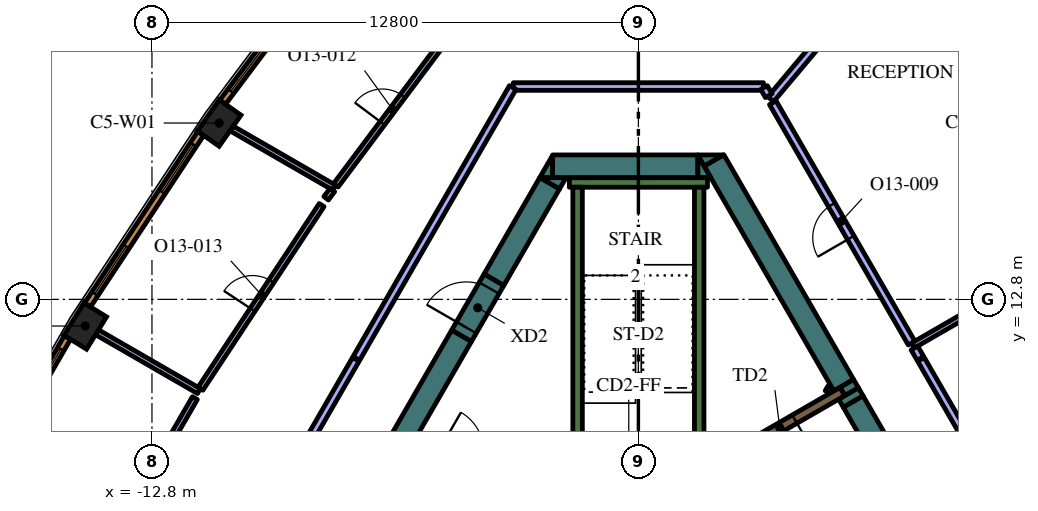
"""IFC4 building model, lengths in metres.
Left out: names, types, materials, properties, quantities, classifications, styles, units other than length and angle.
Written with IfcOpenShell. Run it as: python <this file> out.ifc"""

import sys

from ifc_helpers import new_model, si_unit, direction, frame, frame_2d, origin, origin_2d, place, context, subcontext, project, spatial, polyline, rectangle, outline, extrude, element, fill, save


model = new_model("IFC4")
c1 = context("Model", 3, precision=1e-05, world=origin(), true_north=direction((0.0, 1.0)))
c2 = subcontext(c1, "Body", "Model", "MODEL_VIEW")
j1 = project(units=[si_unit("LENGTHUNIT", "METRE"), si_unit("PLANEANGLEUNIT", "RADIAN")], contexts=[c1])
p1 = place(None, origin())
s1 = spatial("IfcSite", under=j1, at=p1, CompositionType="ELEMENT")
p2 = place(p1, origin())
s2 = spatial("IfcBuilding", under=s1, at=p2, CompositionType="ELEMENT")
p3 = place(p2, frame((0.0, 0.0, 296.4)))
s3 = spatial("IfcBuildingStorey", under=s2, at=p3, CompositionType="ELEMENT", Elevation=296.4)
for number, where, z_axis, x_axis in (
    (1, (-11.032, 17.44, 0.0), (0.0, 0.0, 1.0), (-0.575, -0.818, 0.0)),
    (2, (-14.556, 12.098, 0.0), (0.0, 0.0, 1.0), (-0.526, -0.851, 0.0)),
):
    element("IfcColumn", number, at=place(p3, frame(where, z_axis=z_axis, x_axis=x_axis)), inside=s3, PredefinedType="COLUMN", context=c2, shape_type="SweptSolid", body=[
        extrude(rectangle(XDim=1.0, YDim=0.7, at=origin_2d()), origin(), (0.0, 0.0, 1.0), 4.2),
    ])
p4 = place(p3, frame((5.529, 10.324, 0.0), z_axis=(0.0, 0.0, 1.0), x_axis=(0.499122205112, -0.866531606097, 0.0)))
e3 = element("IfcWall", 3, at=p4, inside=s3, PredefinedType="SOLIDWALL", context=c2, shape_type="SweptSolid", body=[
    extrude(rectangle(XDim=0.247, YDim=0.6, at=frame_2d((0.123, 0.0))), origin(), (0.0, 0.0, 1.0), 4.2),
])
p5 = place(p3, frame((1.989, 16.456, 0.0), z_axis=(0.0, 0.0, 1.0), x_axis=(0.499973159588, -0.866040899549, 0.0)))
e4 = element("IfcWall", 4, at=p5, inside=s3, PredefinedType="SOLIDWALL", context=c2, shape_type="SweptSolid", body=[
    extrude(rectangle(XDim=6.828, YDim=0.6, at=frame_2d((3.414, 0.0))), origin(), (0.0, 0.0, 1.0), 4.2),
])
p6 = place(p3, origin())
e5 = element("IfcWall", 5, at=p6, inside=s3, PredefinedType="SOLIDWALL", context=c2, shape_type="SweptSolid", body=[
    extrude(outline(polyline([(5.664, 10.691), (5.788, 10.476), (5.432, 10.271), (5.308, 10.486), (5.664, 10.691)])), origin(), (0.0, 0.0, 1.0), 4.2),
])
e6 = element("IfcWall", 6, at=p6, inside=s3, PredefinedType="SOLIDWALL", context=c2, shape_type="SweptSolid", body=[
    extrude(outline(polyline([(1.559, 16.6), (2.235, 16.6), (1.728, 16.307), (1.559, 16.6)])), origin(), (0.0, 0.0, 1.0), 4.2),
])
p7 = place(p3, frame((8.192, 5.711, 0.0), z_axis=(0.0, 0.0, 1.0), x_axis=(-0.500006836656, 0.866021456604, 0.0)))
e7 = element("IfcWall", 7, at=p7, inside=s3, PredefinedType="SOLIDWALL", context=c2, shape_type="SweptSolid", body=[
    extrude(rectangle(XDim=5.078, YDim=0.6, at=frame_2d((2.539, 0.0))), origin(), (0.0, 0.0, 1.0), 4.2),
])
p8 = place(p3, frame((-2.258, 16.3, 0.0), z_axis=(0.0, 0.0, 1.0), x_axis=(1.0, 0.0, 0.0)))
e8 = element("IfcWall", 8, at=p8, inside=s3, PredefinedType="SOLIDWALL", context=c2, shape_type="SweptSolid", body=[
    extrude(rectangle(XDim=3.823, YDim=0.6, at=frame_2d((1.912, 0.0))), origin(), (0.0, 0.0, 1.0), 4.2),
])
e9 = element("IfcWall", 9, at=p6, inside=s3, PredefinedType="SOLIDWALL", context=c2, shape_type="SweptSolid", body=[
    extrude(outline(polyline([(1.905, 16.0), (1.567, 16.0), (1.567, 16.585), (1.905, 16.0)])), origin(), (0.0, 0.0, 1.0), 4.2),
])
e10 = element("IfcWall", 10, at=p6, inside=s3, PredefinedType="SOLIDWALL", context=c2, shape_type="SweptSolid", body=[
    extrude(outline(polyline([(-2.598, 16.0), (-2.26, 16.585), (-2.26, 16.0), (-2.598, 16.0)])), origin(), (0.0, 0.0, 1.0), 4.2),
])
p9 = place(p3, frame((-2.335, 15.855, 0.0), z_axis=(0.0, 0.0, 1.0), x_axis=(-0.499960127962, -0.866048422692, 0.0)))
e11 = element("IfcWall", 11, at=p9, inside=s3, PredefinedType="SOLIDWALL", context=c2, shape_type="SweptSolid", body=[
    extrude(rectangle(XDim=2.934, YDim=0.6, at=frame_2d((1.467, 0.0))), origin(), (0.0, 0.0, 1.0), 4.2),
])
e12 = element("IfcWall", 12, at=p6, inside=s3, PredefinedType="SOLIDWALL", context=c2, shape_type="SweptSolid", body=[
    extrude(outline(polyline([(-1.905, 16.0), (-2.074, 15.707), (-2.581, 16.0), (-1.905, 16.0)])), origin(), (0.0, 0.0, 1.0), 4.2),
])
p10 = place(p3, frame((-12.582, -1.892, 0.0), z_axis=(0.0, 0.0, 1.0), x_axis=(0.500003640647, 0.866023301845, 0.0)))
e13 = element("IfcWall", 13, at=p10, inside=s3, PredefinedType="SOLIDWALL", context=c2, shape_type="SweptSolid", body=[
    extrude(rectangle(XDim=15.858, YDim=0.6, at=frame_2d((7.929, 0.0))), origin(), (0.0, 0.0, 1.0), 4.2),
])
p11 = place(p3, frame((-1.817, 15.875, 0.0), z_axis=(0.0, 0.0, 1.0), x_axis=(1.0, 0.0, 0.0)))
e14 = element("IfcWall", 14, at=p11, inside=s3, PredefinedType="SOLIDWALL", context=c2, shape_type="SweptSolid", body=[
    extrude(rectangle(XDim=3.634, YDim=0.25, at=frame_2d((1.817, 0.0))), origin(), (0.0, 0.0, 1.0), 4.2),
])
p12 = place(p3, frame((1.6, 8.95, 0.0), z_axis=(0.0, 0.0, 1.0), x_axis=(0.0, 1.0, 0.0)))
e15 = element("IfcWall", 15, at=p12, inside=s3, PredefinedType="SOLIDWALL", context=c2, shape_type="SweptSolid", body=[
    extrude(rectangle(XDim=6.8, YDim=0.25, at=frame_2d((3.4, 0.0))), origin(), (0.0, 0.0, 1.0), 4.2),
])
p13 = place(p3, frame((-1.6, 8.7, 0.0), z_axis=(0.0, 0.0, 1.0), x_axis=(0.0, 1.0, 0.0)))
e16 = element("IfcWall", 16, at=p13, inside=s3, PredefinedType="SOLIDWALL", context=c2, shape_type="SweptSolid", body=[
    extrude(rectangle(XDim=7.05, YDim=0.25, at=frame_2d((3.525, 0.0))), origin(), (0.0, 0.0, 1.0), 4.2),
])
p14 = place(p3, frame((4.98, 10.358, 0.0), z_axis=(0.0, 0.0, 1.0), x_axis=(0.500640202437, 0.86565546709, 0.0)))
e17 = element("IfcWall", 17, at=p14, inside=s3, PredefinedType="PARTITIONING", context=c2, shape_type="SweptSolid", body=[
    extrude(rectangle(XDim=0.146, YDim=0.15, at=frame_2d((0.073, 0.0))), origin(), (0.0, 0.0, 1.0), 3.55),
])
p15 = place(p3, frame((5.366, 10.373, 0.0), z_axis=(0.0, 0.0, 1.0), x_axis=(-0.866019956843, -0.50000943426, 0.0)))
e18 = element("IfcWall", 18, at=p15, inside=s3, PredefinedType="SOLIDWALL", context=c2, shape_type="SweptSolid", body=[
    extrude(rectangle(XDim=2.7, YDim=0.25, at=frame_2d((1.35, 0.0))), origin(), (0.0, 0.0, 1.0), 4.2),
])
p16 = place(p15, frame((1.45, 0.0, 0.0)))
e19 = element("IfcOpeningElement", 19, at=p16, cuts=e18, PredefinedType="OPENING", context=c2, shape_type="SweptSolid", body=[
    extrude(rectangle(XDim=0.9, YDim=2.1, at=frame_2d((0.45, 1.05))), frame((0.0, 0.135, 0.0), z_axis=(0.0, -1.0, 0.0), x_axis=(1.0, 0.0, 0.0)), (0.0, 0.0, 1.0), 0.27),
])
p17 = place(p3, frame((-4.652, 11.842, 0.0), z_axis=(0.0, 0.0, 1.0), x_axis=(0.500062241894, 0.865989465428, 0.0)))
e20 = element("IfcWall", 20, at=p17, inside=s3, PredefinedType="SOLIDWALL", context=c2, shape_type="SweptSolid", body=[
    extrude(rectangle(XDim=1.7, YDim=0.6, at=frame_2d((0.85, 0.0))), origin(), (0.0, 0.0, 1.0), 4.2),
])
p18 = place(p17, frame((0.25, 0.0, 0.0)))
e21 = element("IfcOpeningElement", 21, at=p18, cuts=e20, PredefinedType="OPENING", context=c2, shape_type="SweptSolid", body=[
    extrude(rectangle(XDim=1.2, YDim=2.1, at=frame_2d((0.6, 1.05))), frame((0.0, 0.31, 0.0), z_axis=(0.0, -1.0, 0.0), x_axis=(1.0, 0.0, 0.0)), (0.0, 0.0, 1.0), 0.62),
])
p19 = place(p3, frame((7.226, 11.585, 0.0), z_axis=(0.0, 0.0, 1.0), x_axis=(0.866021079084, 0.500007490527, 0.0)))
e22 = element("IfcWall", 22, at=p19, inside=s3, PredefinedType="PARTITIONING", context=c2, shape_type="SweptSolid", body=[
    extrude(rectangle(XDim=2.892, YDim=0.15, at=frame_2d((1.446, 0.0))), origin(), (0.0, 0.0, 1.0), 3.55),
])
p20 = place(p3, frame((13.436, 0.829, 0.0), z_axis=(0.0, 0.0, 1.0), x_axis=(-0.49999894854, 0.866026010844, 0.0)))
e23 = element("IfcWall", 23, at=p20, inside=s3, PredefinedType="PARTITIONING", context=c2, shape_type="SweptSolid", body=[
    extrude(rectangle(XDim=12.0, YDim=0.2, at=frame_2d((6.0, 0.0))), origin(), (0.0, 0.0, 1.0), 3.55),
])
p21 = place(p20, frame((5.5, 0.0, 0.0)))
e24 = element("IfcOpeningElement", 24, at=p21, cuts=e23, PredefinedType="OPENING", context=c2, shape_type="SweptSolid", body=[
    extrude(rectangle(XDim=1.0, YDim=2.1, at=frame_2d((0.5, 1.05))), frame((0.0, 0.11, 0.0), z_axis=(0.0, -1.0, 0.0), x_axis=(1.0, 0.0, 0.0)), (0.0, 0.0, 1.0), 0.22),
])
p22 = place(p3, frame((7.421, 11.247, 0.0), z_axis=(0.0, 0.0, 1.0), x_axis=(-0.500303403544, 0.865850162789, 0.0)))
e25 = element("IfcWall", 25, at=p22, inside=s3, PredefinedType="PARTITIONING", context=c2, shape_type="SweptSolid", body=[
    extrude(rectangle(XDim=0.315, YDim=0.2, at=frame_2d((0.158, 0.0))), origin(), (0.0, 0.0, 1.0), 3.55),
])
p23 = place(p3, frame((3.483, 18.067, 0.0), z_axis=(0.0, 0.0, 1.0), x_axis=(0.642896944312, 0.765952687177, 0.0)))
e26 = element("IfcWall", 26, at=p23, inside=s3, PredefinedType="PARTITIONING", context=c2, shape_type="SweptSolid", body=[
    extrude(rectangle(XDim=2.29, YDim=0.2, at=frame_2d((1.145, 0.0))), origin(), (0.0, 0.0, 1.0), 3.55),
])
p24 = place(p3, frame((7.188, 11.65, 0.0), z_axis=(0.0, 0.0, 1.0), x_axis=(-0.499989634868, 0.866031388014, 0.0)))
e27 = element("IfcWall", 27, at=p24, inside=s3, PredefinedType="PARTITIONING", context=c2, shape_type="SweptSolid", body=[
    extrude(rectangle(XDim=7.303, YDim=0.2, at=frame_2d((3.652, 0.0))), origin(), (0.0, 0.0, 1.0), 3.55),
])
p25 = place(p24, frame((3.2, 0.0, 0.0)))
e28 = element("IfcOpeningElement", 28, at=p25, cuts=e27, PredefinedType="OPENING", context=c2, shape_type="SweptSolid", body=[
    extrude(rectangle(XDim=1.0, YDim=2.1, at=frame_2d((0.5, 1.05))), frame((0.0, 0.11, 0.0), z_axis=(0.0, -1.0, 0.0), x_axis=(1.0, 0.0, 0.0)), (0.0, 0.0, 1.0), 0.22),
])
p26 = place(p3, frame((-8.007, 15.74, 0.0), z_axis=(0.0, 0.0, 1.0), x_axis=(-0.866044607523, 0.499966736674, 0.0)))
e29 = element("IfcWall", 29, at=p26, inside=s3, PredefinedType="PARTITIONING", context=c2, shape_type="SweptSolid", body=[
    extrude(rectangle(XDim=3.115, YDim=0.15, at=frame_2d((1.557, 0.0))), origin(), (0.0, 0.0, 1.0), 3.55),
])
p27 = place(p3, frame((-7.962, 15.8, 0.0), z_axis=(0.0, 0.0, 1.0), x_axis=(0.599541489613, 0.800343677574, 0.0)))
e30 = element("IfcWall", 30, at=p27, inside=s3, PredefinedType="PARTITIONING", context=c2, shape_type="SweptSolid", body=[
    extrude(rectangle(XDim=4.942, YDim=0.15, at=frame_2d((2.471, 0.0))), origin(), (0.0, 0.0, 1.0), 3.55),
])
p28 = place(p27, frame((2.042, 0.0, 0.0)))
e31 = element("IfcOpeningElement", 31, at=p28, cuts=e30, PredefinedType="OPENING", context=c2, shape_type="SweptSolid", body=[
    extrude(rectangle(XDim=0.9, YDim=2.1, at=frame_2d((0.45, 1.05))), frame((0.0, 0.085, 0.0), z_axis=(0.0, -1.0, 0.0), x_axis=(1.0, 0.0, 0.0)), (0.0, 0.0, 1.0), 0.17),
])
p29 = place(p3, frame((-11.564, 10.387, 0.0), z_axis=(0.0, 0.0, 1.0), x_axis=(-0.86604641216, 0.499963610661, 0.0)))
e32 = element("IfcWall", 32, at=p29, inside=s3, PredefinedType="PARTITIONING", context=c2, shape_type="SweptSolid", body=[
    extrude(rectangle(XDim=3.096, YDim=0.15, at=frame_2d((1.548, 0.0))), origin(), (0.0, 0.0, 1.0), 3.55),
])
p30 = place(p3, frame((-8.052, 15.679, 0.0), z_axis=(0.0, 0.0, 1.0), x_axis=(-0.599004157744, -0.800745914136, 0.0)))
e33 = element("IfcWall", 33, at=p30, inside=s3, PredefinedType="PARTITIONING", context=c2, shape_type="SweptSolid", body=[
    extrude(rectangle(XDim=0.275, YDim=0.15, at=frame_2d((0.137, 0.0))), origin(), (0.0, 0.0, 1.0), 3.55),
])
p31 = place(p3, frame((-11.523, 10.449, 0.0), z_axis=(0.0, 0.0, 1.0), x_axis=(0.550751709023, 0.834669129061, 0.0)))
e34 = element("IfcWall", 34, at=p31, inside=s3, PredefinedType="PARTITIONING", context=c2, shape_type="SweptSolid", body=[
    extrude(rectangle(XDim=5.788, YDim=0.15, at=frame_2d((2.894, 0.0))), origin(), (0.0, 0.0, 1.0), 3.55),
])
p32 = place(p31, frame((2.488, 0.0, 0.0)))
e35 = element("IfcOpeningElement", 35, at=p32, cuts=e34, PredefinedType="OPENING", context=c2, shape_type="SweptSolid", body=[
    extrude(rectangle(XDim=0.9, YDim=2.1, at=frame_2d((0.45, 1.05))), frame((0.0, 0.085, 0.0), z_axis=(0.0, -1.0, 0.0), x_axis=(1.0, 0.0, 0.0)), (0.0, 0.0, 1.0), 0.17),
])
p33 = place(p3, frame((-14.74, 4.887, 0.0), z_axis=(0.0, 0.0, 1.0), x_axis=(0.500007141444, 0.86602128063, 0.0)))
e36 = element("IfcWall", 36, at=p33, inside=s3, PredefinedType="PARTITIONING", context=c2, shape_type="SweptSolid", body=[
    extrude(rectangle(XDim=6.137, YDim=0.15, at=frame_2d((3.068, 0.0))), origin(), (0.0, 0.0, 1.0), 3.55),
])
p34 = place(p33, frame((2.637, 0.0, 0.0)))
e37 = element("IfcOpeningElement", 37, at=p34, cuts=e36, PredefinedType="OPENING", context=c2, shape_type="SweptSolid", body=[
    extrude(rectangle(XDim=0.9, YDim=2.1, at=frame_2d((0.45, 1.05))), frame((0.0, 0.085, 0.0), z_axis=(0.0, -1.0, 0.0), x_axis=(1.0, 0.0, 0.0)), (0.0, 0.0, 1.0), 0.17),
])
p35 = place(p3, frame((-7.436, 11.221, 0.0), z_axis=(0.0, 0.0, 1.0), x_axis=(-0.49999894854, -0.866026010844, 0.0)))
e38 = element("IfcWall", 38, at=p35, inside=s3, PredefinedType="PARTITIONING", context=c2, shape_type="SweptSolid", body=[
    extrude(rectangle(XDim=12.0, YDim=0.2, at=frame_2d((6.0, 0.0))), origin(), (0.0, 0.0, 1.0), 3.55),
])
p36 = place(p35, frame((5.5, 0.0, 0.0)))
e39 = element("IfcOpeningElement", 39, at=p36, cuts=e38, PredefinedType="OPENING", context=c2, shape_type="SweptSolid", body=[
    extrude(rectangle(XDim=1.0, YDim=2.1, at=frame_2d((0.5, 1.05))), frame((0.0, 0.11, 0.0), z_axis=(0.0, -1.0, 0.0), x_axis=(1.0, 0.0, 0.0)), (0.0, 0.0, 1.0), 0.22),
])
p37 = place(p3, frame((3.291, 18.4, 0.0), z_axis=(0.0, 0.0, 1.0), x_axis=(-1.0, 0.0, 0.0)))
e40 = element("IfcWall", 40, at=p37, inside=s3, PredefinedType="PARTITIONING", context=c2, shape_type="SweptSolid", body=[
    extrude(rectangle(XDim=6.582, YDim=0.2, at=frame_2d((3.291, 0.0))), origin(), (0.0, 0.0, 1.0), 3.55),
])
p38 = place(p3, frame((-3.306, 18.374, 0.0), z_axis=(0.0, 0.0, 1.0), x_axis=(-0.499999798456, -0.866025520146, 0.0)))
e41 = element("IfcWall", 41, at=p38, inside=s3, PredefinedType="PARTITIONING", context=c2, shape_type="SweptSolid", body=[
    extrude(rectangle(XDim=8.229, YDim=0.2, at=frame_2d((4.115, 0.0))), origin(), (0.0, 0.0, 1.0), 3.55),
])
p39 = place(p3, frame((3.43, 18.159, 0.0), z_axis=(0.0, 0.0, 1.0), x_axis=(-0.499949632511, 0.866054481515, 0.0)))
e42 = element("IfcWall", 42, at=p39, inside=s3, PredefinedType="PARTITIONING", context=c2, shape_type="SweptSolid", body=[
    extrude(rectangle(XDim=0.248, YDim=0.2, at=frame_2d((0.124, 0.0))), origin(), (0.0, 0.0, 1.0), 3.55),
])
p40 = place(p3, frame((10.938, 17.99, 0.0), z_axis=(0.0, 0.0, 1.0), x_axis=(-0.599559865294, 0.800329911929, 0.0)))
e43 = element("IfcWall", 43, at=p40, inside=s3, PredefinedType="SOLIDWALL", context=c2, shape_type="SweptSolid", body=[
    extrude(rectangle(XDim=5.415, YDim=0.19, at=frame_2d((2.708, 0.0))), origin(), (0.0, 0.0, 1.0), 3.95),
])
p41 = place(p40, frame((0.358, 0.0, 0.6)))
e44 = element("IfcOpeningElement", 44, at=p41, cuts=e43, PredefinedType="OPENING", context=c2, shape_type="SweptSolid", body=[
    extrude(rectangle(XDim=1.5, YDim=2.85, at=frame_2d((0.75, 1.425))), frame((0.0, 0.105, 0.0), z_axis=(0.0, -1.0, 0.0), x_axis=(1.0, 0.0, 0.0)), (0.0, 0.0, 1.0), 0.21),
])
p42 = place(p40, frame((3.593, 0.0, 0.6)))
e45 = element("IfcOpeningElement", 45, at=p42, cuts=e43, PredefinedType="OPENING", context=c2, shape_type="SweptSolid", body=[
    extrude(rectangle(XDim=1.5, YDim=2.85, at=frame_2d((0.75, 1.425))), frame((0.0, 0.105, 0.0), z_axis=(0.0, -1.0, 0.0), x_axis=(1.0, 0.0, 0.0)), (0.0, 0.0, 1.0), 0.21),
])
p43 = place(p3, frame((-7.692, 22.324, 0.0), z_axis=(0.0, 0.0, 1.0), x_axis=(-0.599559865294, -0.800329911929, 0.0)))
e46 = element("IfcWall", 46, at=p43, inside=s3, PredefinedType="SOLIDWALL", context=c2, shape_type="SweptSolid", body=[
    extrude(rectangle(XDim=5.415, YDim=0.19, at=frame_2d((2.708, 0.0))), origin(), (0.0, 0.0, 1.0), 3.95),
])
p44 = place(p43, frame((0.323, 0.0, 0.6)))
e47 = element("IfcOpeningElement", 47, at=p44, cuts=e46, PredefinedType="OPENING", context=c2, shape_type="SweptSolid", body=[
    extrude(rectangle(XDim=1.5, YDim=2.85, at=frame_2d((0.75, 1.425))), frame((0.0, 0.105, 0.0), z_axis=(0.0, -1.0, 0.0), x_axis=(1.0, 0.0, 0.0)), (0.0, 0.0, 1.0), 0.21),
])
p45 = place(p43, frame((3.558, 0.0, 0.6)))
e48 = element("IfcOpeningElement", 48, at=p45, cuts=e46, PredefinedType="OPENING", context=c2, shape_type="SweptSolid", body=[
    extrude(rectangle(XDim=1.5, YDim=2.85, at=frame_2d((0.75, 1.425))), frame((0.0, 0.105, 0.0), z_axis=(0.0, -1.0, 0.0), x_axis=(1.0, 0.0, 0.0)), (0.0, 0.0, 1.0), 0.21),
])
p46 = place(p3, frame((-11.518, 17.166, 0.0), z_axis=(0.0, 0.0, 1.0), x_axis=(-0.550744054781, -0.83467417962, 0.0)))
e49 = element("IfcWall", 49, at=p46, inside=s3, PredefinedType="SOLIDWALL", context=c2, shape_type="SweptSolid", body=[
    extrude(rectangle(XDim=5.406, YDim=0.19, at=frame_2d((2.703, 0.0))), origin(), (0.0, 0.0, 1.0), 3.95),
])
p47 = place(p46, frame((0.346, 0.0, 0.6)))
e50 = element("IfcOpeningElement", 50, at=p47, cuts=e49, PredefinedType="OPENING", context=c2, shape_type="SweptSolid", body=[
    extrude(rectangle(XDim=1.5, YDim=2.85, at=frame_2d((0.75, 1.425))), frame((0.0, 0.105, 0.0), z_axis=(0.0, -1.0, 0.0), x_axis=(1.0, 0.0, 0.0)), (0.0, 0.0, 1.0), 0.21),
])
p48 = place(p46, frame((3.559, 0.0, 0.6)))
e51 = element("IfcOpeningElement", 51, at=p48, cuts=e49, PredefinedType="OPENING", context=c2, shape_type="SweptSolid", body=[
    extrude(rectangle(XDim=1.5, YDim=2.85, at=frame_2d((0.75, 1.425))), frame((0.0, 0.105, 0.0), z_axis=(0.0, -1.0, 0.0), x_axis=(1.0, 0.0, 0.0)), (0.0, 0.0, 1.0), 0.21),
])
p49 = place(p3, frame((-15.025, 11.796, 0.0), z_axis=(0.0, 0.0, 1.0), x_axis=(-0.500024767483, -0.866011103799, 0.0)))
e52 = element("IfcWall", 52, at=p49, inside=s3, PredefinedType="SOLIDWALL", context=c2, shape_type="SweptSolid", body=[
    extrude(rectangle(XDim=5.406, YDim=0.19, at=frame_2d((2.703, 0.0))), origin(), (0.0, 0.0, 1.0), 3.95),
])
p50 = place(p49, frame((0.346, 0.0, 0.6)))
e53 = element("IfcOpeningElement", 53, at=p50, cuts=e52, PredefinedType="OPENING", context=c2, shape_type="SweptSolid", body=[
    extrude(rectangle(XDim=1.5, YDim=2.85, at=frame_2d((0.75, 1.425))), frame((0.0, 0.105, 0.0), z_axis=(0.0, -1.0, 0.0), x_axis=(1.0, 0.0, 0.0)), (0.0, 0.0, 1.0), 0.21),
])
p51 = place(p49, frame((3.559, 0.0, 0.6)))
e54 = element("IfcOpeningElement", 54, at=p51, cuts=e52, PredefinedType="OPENING", context=c2, shape_type="SweptSolid", body=[
    extrude(rectangle(XDim=1.5, YDim=2.85, at=frame_2d((0.75, 1.425))), frame((0.0, 0.105, 0.0), z_axis=(0.0, -1.0, 0.0), x_axis=(1.0, 0.0, 0.0)), (0.0, 0.0, 1.0), 0.21),
])
p52 = place(p16, origin())
e55 = element("IfcDoor", 55, at=p52, inside=s3, OperationType="SINGLE_SWING_LEFT", PredefinedType="DOOR", context=c2, shape_type="SweptSolid", body=[
    extrude(rectangle(XDim=0.9, YDim=2.1, at=frame_2d((0.45, 1.05))), frame((0.0, 0.025, 0.0), z_axis=(0.0, -1.0, 0.0), x_axis=(1.0, 0.0, 0.0)), (0.0, 0.0, 1.0), 0.05),
])
fill(e19, e55)
p53 = place(p18, origin())
e56 = element("IfcDoor", 56, at=p53, inside=s3, OperationType="SINGLE_SWING_LEFT", PredefinedType="DOOR", context=c2, shape_type="SweptSolid", body=[
    extrude(rectangle(XDim=1.2, YDim=2.1, at=frame_2d((0.6, 1.05))), frame((0.0, 0.025, 0.0), z_axis=(0.0, -1.0, 0.0), x_axis=(1.0, 0.0, 0.0)), (0.0, 0.0, 1.0), 0.05),
])
fill(e21, e56)
p54 = place(p25, origin())
e57 = element("IfcDoor", 57, at=p54, inside=s3, OperationType="SINGLE_SWING_RIGHT", PredefinedType="DOOR", context=c2, shape_type="SweptSolid", body=[
    extrude(rectangle(XDim=1.0, YDim=2.1, at=frame_2d((0.5, 1.05))), frame((0.0, 0.025, 0.0), z_axis=(0.0, -1.0, 0.0), x_axis=(1.0, 0.0, 0.0)), (0.0, 0.0, 1.0), 0.05),
])
fill(e28, e57)
p55 = place(p28, origin())
e58 = element("IfcDoor", 58, at=p55, inside=s3, OperationType="SINGLE_SWING_RIGHT", PredefinedType="DOOR", context=c2, shape_type="SweptSolid", body=[
    extrude(rectangle(XDim=0.9, YDim=2.1, at=frame_2d((0.45, 1.05))), frame((0.0, 0.025, 0.0), z_axis=(0.0, -1.0, 0.0), x_axis=(1.0, 0.0, 0.0)), (0.0, 0.0, 1.0), 0.05),
])
fill(e31, e58)
p56 = place(p32, origin())
e59 = element("IfcDoor", 59, at=p56, inside=s3, OperationType="SINGLE_SWING_RIGHT", PredefinedType="DOOR", context=c2, shape_type="SweptSolid", body=[
    extrude(rectangle(XDim=0.9, YDim=2.1, at=frame_2d((0.45, 1.05))), frame((0.0, 0.025, 0.0), z_axis=(0.0, -1.0, 0.0), x_axis=(1.0, 0.0, 0.0)), (0.0, 0.0, 1.0), 0.05),
])
fill(e35, e59)
p57 = place(p45, origin())
e60 = element("IfcWindow", 60, at=p57, inside=s3, PartitioningType="SINGLE_PANEL", PredefinedType="WINDOW", context=c2, shape_type="SweptSolid", body=[
    extrude(rectangle(XDim=1.5, YDim=2.85, at=frame_2d((0.75, 1.425))), frame((0.0, 0.045, 0.0), z_axis=(0.0, -1.0, 0.0), x_axis=(1.0, 0.0, 0.0)), (0.0, 0.0, 1.0), 0.06),
])
fill(e48, e60)
p58 = place(p47, origin())
e61 = element("IfcWindow", 61, at=p58, inside=s3, PartitioningType="SINGLE_PANEL", PredefinedType="WINDOW", context=c2, shape_type="SweptSolid", body=[
    extrude(rectangle(XDim=1.5, YDim=2.85, at=frame_2d((0.75, 1.425))), frame((0.0, 0.045, 0.0), z_axis=(0.0, -1.0, 0.0), x_axis=(1.0, 0.0, 0.0)), (0.0, 0.0, 1.0), 0.06),
])
fill(e50, e61)
p59 = place(p48, origin())
e62 = element("IfcWindow", 62, at=p59, inside=s3, PartitioningType="SINGLE_PANEL", PredefinedType="WINDOW", context=c2, shape_type="SweptSolid", body=[
    extrude(rectangle(XDim=1.5, YDim=2.85, at=frame_2d((0.75, 1.425))), frame((0.0, 0.045, 0.0), z_axis=(0.0, -1.0, 0.0), x_axis=(1.0, 0.0, 0.0)), (0.0, 0.0, 1.0), 0.06),
])
fill(e51, e62)
p60 = place(p50, origin())
e63 = element("IfcWindow", 63, at=p60, inside=s3, PartitioningType="SINGLE_PANEL", PredefinedType="WINDOW", context=c2, shape_type="SweptSolid", body=[
    extrude(rectangle(XDim=1.5, YDim=2.85, at=frame_2d((0.75, 1.425))), frame((0.0, 0.045, 0.0), z_axis=(0.0, -1.0, 0.0), x_axis=(1.0, 0.0, 0.0)), (0.0, 0.0, 1.0), 0.06),
])
fill(e53, e63)
save(model, sys.argv[1])
